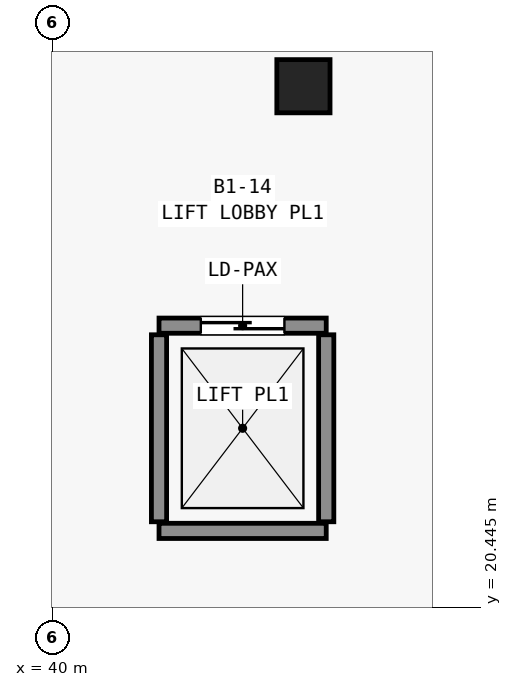
"""IFC4 building model, lengths in metres.
Left out: names, types, materials, properties, quantities, classifications, styles, units other than length and angle.
Written with IfcOpenShell. Run it as: python <this file> out.ifc"""

import sys

from ifc_helpers import new_model, si_unit, direction, frame, frame_2d, origin, origin_2d, place, context, subcontext, project, spatial, rectangle, extrude, element, fill, save


model = new_model("IFC4")
c1 = context("Model", 3, precision=1e-05, world=origin(), true_north=direction((0.0, 1.0)))
c2 = subcontext(c1, "Body", "Model", "MODEL_VIEW")
j1 = project(units=[si_unit("LENGTHUNIT", "METRE"), si_unit("PLANEANGLEUNIT", "RADIAN")], contexts=[c1])
p1 = place(None, origin())
s1 = spatial("IfcSite", under=j1, at=p1, CompositionType="ELEMENT")
p2 = place(p1, origin())
s2 = spatial("IfcBuilding", under=s1, at=p2, CompositionType="ELEMENT")
p3 = place(p2, frame((0.0, 0.0, -5.4)))
s3 = spatial("IfcBuildingStorey", under=s2, at=p3, CompositionType="ELEMENT", Elevation=-5.4)
p4 = place(p3, frame((43.3, 27.3, 0.0), z_axis=(0.0, 0.0, 1.0), x_axis=(1.0, 0.0, 0.0)))
e1 = element("IfcColumn", 1, at=p4, inside=s3, PredefinedType="COLUMN", context=c2, shape_type="SweptSolid", body=[
    extrude(rectangle(XDim=0.7, YDim=0.7, at=origin_2d()), origin(), (0.0, 0.0, 1.0), 5.4),
])
p5 = place(p3, frame((41.4, 21.45, 0.0), z_axis=(0.0, 0.0, 1.0), x_axis=(1.0, 0.0, 0.0)))
e2 = element("IfcWall", 2, at=p5, inside=s3, PredefinedType="STANDARD", context=c2, shape_type="SweptSolid", body=[
    extrude(rectangle(XDim=2.2, YDim=0.2, at=frame_2d((1.1, 0.0))), origin(), (0.0, 0.0, 1.0), 4.96),
])
p6 = place(p3, frame((41.4, 24.15, 0.0), z_axis=(0.0, 0.0, 1.0), x_axis=(1.0, 0.0, 0.0)))
e3 = element("IfcWall", 3, at=p6, inside=s3, PredefinedType="STANDARD", context=c2, shape_type="SweptSolid", body=[
    extrude(rectangle(XDim=2.2, YDim=0.2, at=frame_2d((1.1, 0.0))), origin(), (0.0, 0.0, 1.0), 4.96),
])
p7 = place(p6, frame((0.55, 0.0, 0.0)))
e4 = element("IfcOpeningElement", 4, at=p7, cuts=e3, PredefinedType="OPENING", context=c2, shape_type="SweptSolid", body=[
    extrude(rectangle(XDim=1.1, YDim=2.15, at=frame_2d((0.55, 1.075))), frame((0.0, 0.11, 0.0), z_axis=(0.0, -1.0, 0.0), x_axis=(1.0, 0.0, 0.0)), (0.0, 0.0, 1.0), 0.22),
])
for number, where, z_axis, x_axis in (
    (5, (41.4, 21.57, 0.0), (0.0, 0.0, 1.0), (0.0, 1.0, 0.0)),
    (6, (43.6, 21.57, 0.0), (0.0, 0.0, 1.0), (0.0, 1.0, 0.0)),
):
    element("IfcWall", number, at=place(p3, frame(where, z_axis=z_axis, x_axis=x_axis)), inside=s3, PredefinedType="STANDARD", context=c2, shape_type="SweptSolid", body=[
        extrude(rectangle(XDim=2.46, YDim=0.2, at=frame_2d((1.23, 0.0))), origin(), (0.0, 0.0, 1.0), 4.96),
    ])
p8 = place(p7, origin())
e7 = element("IfcDoor", 7, at=p8, inside=s3, OperationType="SLIDING_TO_LEFT", PredefinedType="DOOR", context=c2, shape_type="SweptSolid", body=[
    extrude(rectangle(XDim=1.1, YDim=2.15, at=frame_2d((0.55, 1.075))), frame((0.0, 0.025, 0.0), z_axis=(0.0, -1.0, 0.0), x_axis=(1.0, 0.0, 0.0)), (0.0, 0.0, 1.0), 0.05),
])
fill(e4, e7)
save(model, sys.argv[1])
